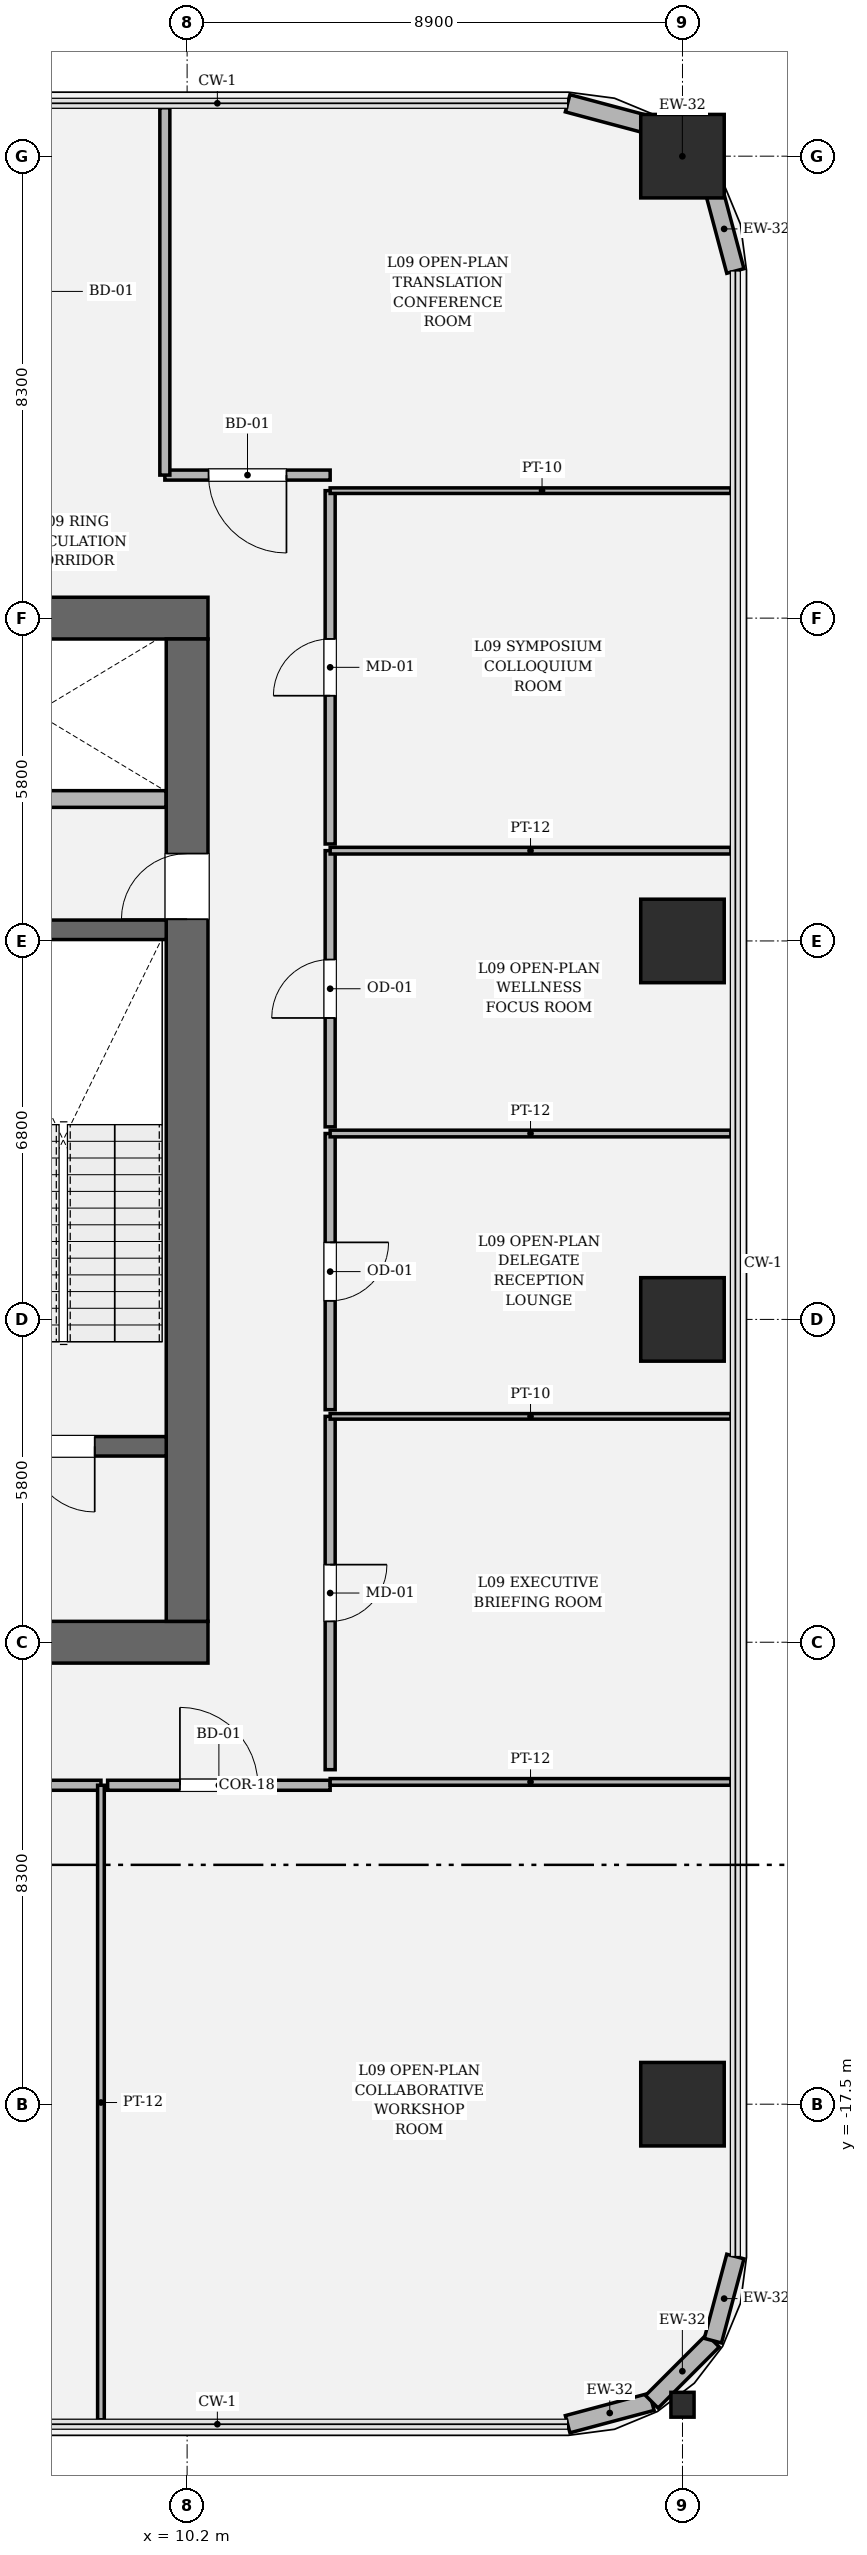
"""IFC4 building model, lengths in metres.
Left out: names, types, materials, properties, quantities, classifications, styles, units other than length and angle.
Written with IfcOpenShell. Run it as: python <this file> out.ifc"""

import sys

from ifc_helpers import new_model, si_unit, direction, frame, frame_2d, origin, origin_2d, place, context, subcontext, project, spatial, rectangle, hollow_rectangle, i_section, extrude, element, fill, save


model = new_model("IFC4")
c1 = context("Model", 3, precision=1e-05, world=origin(), true_north=direction((0.0, 1.0)))
c2 = subcontext(c1, "Body", "Model", "MODEL_VIEW")
j1 = project(units=[si_unit("LENGTHUNIT", "METRE"), si_unit("PLANEANGLEUNIT", "RADIAN")], contexts=[c1])
p1 = place(None, origin())
s1 = spatial("IfcSite", under=j1, at=p1, CompositionType="ELEMENT")
p2 = place(p1, origin())
s2 = spatial("IfcBuilding", under=s1, at=p2, CompositionType="ELEMENT")
p3 = place(p2, frame((0.0, 0.0, 44.4)))
s3 = spatial("IfcBuildingStorey", under=s2, at=p3, CompositionType="ELEMENT", Elevation=44.4)
p4 = place(p3, frame((10.575, -9.2, 0.0), z_axis=(0.0, 0.0, 1.0), x_axis=(-1.0, 0.0, 0.0)))
e1 = element("IfcWall", 1, at=p4, inside=s3, PredefinedType="SHEAR", context=c2, shape_type="SweptSolid", body=[
    extrude(rectangle(XDim=21.15, YDim=0.75, at=frame_2d((10.575, 0.0))), origin(), (0.0, 0.0, 1.0), 4.05),
])
p5 = place(p4, frame((2.85, 0.0, 0.0)))
e2 = element("IfcOpeningElement", 2, at=p5, cuts=e1, PredefinedType="OPENING", context=c2, shape_type="SweptSolid", body=[
    extrude(rectangle(XDim=1.25, YDim=2.25, at=frame_2d((0.625, 1.125))), frame((0.0, 0.385, 0.0), z_axis=(0.0, -1.0, 0.0), x_axis=(1.0, 0.0, 0.0)), (0.0, 0.0, 1.0), 0.77),
])
p6 = place(p4, frame((17.05, 0.0, 0.0)))
e3 = element("IfcOpeningElement", 3, at=p6, cuts=e1, PredefinedType="OPENING", context=c2, shape_type="SweptSolid", body=[
    extrude(rectangle(XDim=1.25, YDim=2.25, at=frame_2d((0.625, 1.125))), frame((0.0, 0.385, 0.0), z_axis=(0.0, -1.0, 0.0), x_axis=(1.0, 0.0, 0.0)), (0.0, 0.0, 1.0), 0.77),
])
p7 = place(p3, frame((-10.575, 9.2, 0.0), z_axis=(0.0, 0.0, 1.0), x_axis=(1.0, 0.0, 0.0)))
e4 = element("IfcWall", 4, at=p7, inside=s3, PredefinedType="SHEAR", context=c2, shape_type="SweptSolid", body=[
    extrude(rectangle(XDim=21.15, YDim=0.75, at=frame_2d((10.575, 0.0))), origin(), (0.0, 0.0, 1.0), 4.05),
])
p8 = place(p3, frame((10.2, 8.825, 0.0), z_axis=(0.0, 0.0, 1.0), x_axis=(0.0, -1.0, 0.0)))
e5 = element("IfcWall", 5, at=p8, inside=s3, PredefinedType="SHEAR", context=c2, shape_type="SweptSolid", body=[
    extrude(rectangle(XDim=17.65, YDim=0.75, at=frame_2d((8.825, 0.0))), origin(), (0.0, 0.0, 1.0), 4.05),
])
p9 = place(p8, frame((3.855, 0.0, 0.0)))
e6 = element("IfcOpeningElement", 6, at=p9, cuts=e5, PredefinedType="OPENING", context=c2, shape_type="SweptSolid", body=[
    extrude(rectangle(XDim=1.18, YDim=2.2, at=frame_2d((0.59, 1.1))), frame((0.0, 0.385, 0.0), z_axis=(0.0, -1.0, 0.0), x_axis=(1.0, 0.0, 0.0)), (0.0, 0.0, 1.0), 0.77),
])
p10 = place(p3, frame((4.65, -5.68, 0.0), z_axis=(0.0, 0.0, 1.0), x_axis=(1.0, 0.0, 0.0)))
e7 = element("IfcWall", 7, at=p10, inside=s3, PredefinedType="SOLIDWALL", context=c2, shape_type="SweptSolid", body=[
    extrude(rectangle(XDim=5.175, YDim=0.35, at=frame_2d((2.587, 0.0))), origin(), (0.0, 0.0, 1.0), 4.05),
])
p11 = place(p10, frame((2.71, 0.0, 0.0)))
e8 = element("IfcOpeningElement", 8, at=p11, cuts=e7, PredefinedType="OPENING", context=c2, shape_type="SweptSolid", body=[
    extrude(rectangle(XDim=1.18, YDim=2.2, at=frame_2d((0.59, 1.1))), frame((0.0, 0.185, 0.0), z_axis=(0.0, -1.0, 0.0), x_axis=(1.0, 0.0, 0.0)), (0.0, 0.0, 1.0), 0.37),
])
p12 = place(p3, frame((4.65, 3.6, 0.0), z_axis=(0.0, 0.0, 1.0), x_axis=(1.0, 0.0, 0.0)))
e9 = element("IfcWall", 9, at=p12, inside=s3, PredefinedType="SOLIDWALL", context=c2, shape_type="SweptSolid", body=[
    extrude(rectangle(XDim=5.175, YDim=0.35, at=frame_2d((2.587, 0.0))), origin(), (0.0, 0.0, 1.0), 4.05),
])
for number, where, z_axis, x_axis in (
    (10, (19.1, -17.5, 0.0), (0.0, 0.0, 1.0), (1.0, 0.0, 0.0)),
    (11, (19.1, -3.4, 0.0), (0.0, 0.0, 1.0), (1.0, 0.0, 0.0)),
    (12, (19.1, 3.4, 0.0), (0.0, 0.0, 1.0), (1.0, 0.0, 0.0)),
    (13, (19.1, 17.5, 0.0), (0.0, 0.0, 1.0), (1.0, 0.0, 0.0)),
):
    element("IfcColumn", number, at=place(p3, frame(where, z_axis=z_axis, x_axis=x_axis)), inside=s3, PredefinedType="COLUMN", context=c2, shape_type="SweptSolid", body=[
        extrude(hollow_rectangle(XDim=1.5, YDim=1.5, WallThickness=0.045, at=origin_2d()), origin(), (0.0, 0.0, 1.0), 4.05),
    ])
p13 = place(p3, frame((19.1, -22.9, 0.0), z_axis=(0.0, 0.0, 1.0), x_axis=(1.0, 0.0, 0.0)))
e14 = element("IfcColumn", 14, at=p13, inside=s3, PredefinedType="COLUMN", context=c2, shape_type="SweptSolid", body=[
    extrude(i_section(OverallWidth=0.416, OverallDepth=0.446, WebThickness=0.039, FlangeThickness=0.062, FilletRadius=0.018, at=origin_2d()), origin(), (0.0, 0.0, 1.0), 4.048),
])
p14 = place(p3, frame((17.037, -23.25, 0.0), z_axis=(0.0, 0.0, 1.0), x_axis=(0.966224582397, 0.257701486942, 0.0)))
e15 = element("IfcWall", 15, at=p14, inside=s3, PredefinedType="SOLIDWALL", context=c2, shape_type="SweptSolid", body=[
    extrude(rectangle(XDim=1.565, YDim=0.32, at=frame_2d((0.783, 0.0))), origin(), (0.0, 0.0, 1.0), 2.524),
])
p15 = place(p3, frame((18.549, -22.847, 0.0), z_axis=(0.0, 0.0, 1.0), x_axis=(0.707028130747, 0.707185422879, 0.0)))
e16 = element("IfcWall", 16, at=p15, inside=s3, PredefinedType="SOLIDWALL", context=c2, shape_type="SweptSolid", body=[
    extrude(rectangle(XDim=1.552, YDim=0.32, at=frame_2d((0.776, 0.0))), origin(), (0.0, 0.0, 1.0), 2.484),
])
for number, where, z_axis, x_axis in (
    (17, (19.646, -21.749, 0.0), (0.0, 0.0, 1.0), (0.258, 0.966, 0.0)),
    (18, (20.05, 15.437, 0.0), (0.0, 0.0, 1.0), (-0.258, 0.966, 0.0)),
):
    element("IfcWall", number, at=place(p3, frame(where, z_axis=z_axis, x_axis=x_axis)), inside=s3, PredefinedType="SOLIDWALL", context=c2, shape_type="SweptSolid", body=[
        extrude(rectangle(XDim=1.565, YDim=0.32, at=frame_2d((0.783, 0.0))), origin(), (0.0, 0.0, 1.0), 3.81),
    ])
p16 = place(p3, frame((19.646, 16.949, 0.0), z_axis=(0.0, 0.0, 1.0), x_axis=(-0.707106781187, 0.707106781187, 0.0)))
e19 = element("IfcWall", 19, at=p16, inside=s3, PredefinedType="SOLIDWALL", context=c2, shape_type="SweptSolid", body=[
    extrude(rectangle(XDim=1.552, YDim=0.32, at=frame_2d((0.776, 0.0))), origin(), (0.0, 0.0, 1.0), 3.104),
])
p17 = place(p3, frame((18.549, 18.047, 0.0), z_axis=(0.0, 0.0, 1.0), x_axis=(-0.966224582397, 0.257701486942, 0.0)))
e20 = element("IfcWall", 20, at=p17, inside=s3, PredefinedType="SOLIDWALL", context=c2, shape_type="SweptSolid", body=[
    extrude(rectangle(XDim=1.565, YDim=0.32, at=frame_2d((0.783, 0.0))), origin(), (0.0, 0.0, 1.0), 3.81),
])
p18 = place(p3, frame((5.06, 5.95, 0.0), z_axis=(0.0, 0.0, 1.0), x_axis=(1.0, 0.0, 0.0)))
e21 = element("IfcWall", 21, at=p18, inside=s3, PredefinedType="SOLIDWALL", context=c2, shape_type="SweptSolid", body=[
    extrude(rectangle(XDim=4.76, YDim=0.3, at=frame_2d((2.38, 0.0))), origin(), (0.0, 0.0, 1.0), 3.81),
])
p19 = place(p3, frame((-7.4, -11.77, 0.0), z_axis=(0.0, 0.0, 1.0), x_axis=(1.0, 0.0, 0.0)))
e22 = element("IfcWall", 22, at=p19, inside=s3, PredefinedType="PARTITIONING", context=c2, shape_type="SweptSolid", body=[
    extrude(rectangle(XDim=16.052, YDim=0.18, at=frame_2d((8.026, 0.0))), origin(), (0.0, 0.0, 1.0), 3.104),
])
p20 = place(p3, frame((8.652, -11.77, 0.0), z_axis=(0.0, 0.0, 1.0), x_axis=(0.0, -1.0, 0.0)))
e23 = element("IfcWall", 23, at=p20, inside=s3, PredefinedType="PARTITIONING", context=c2, shape_type="SweptSolid", body=[
    extrude(rectangle(XDim=11.4, YDim=0.12, at=frame_2d((5.7, 0.0))), origin(), (0.0, 0.0, 1.0), 2.524),
])
p21 = place(p3, frame((8.772, -11.77, 0.0), z_axis=(0.0, 0.0, 1.0), x_axis=(1.0, 0.0, 0.0)))
e24 = element("IfcWall", 24, at=p21, inside=s3, PredefinedType="PARTITIONING", context=c2, shape_type="SweptSolid", body=[
    extrude(rectangle(XDim=3.998, YDim=0.18, at=frame_2d((1.999, 0.0))), origin(), (0.0, 0.0, 1.0), 3.104),
])
p22 = place(p21, frame((1.299, 0.0, 0.0)))
e25 = element("IfcOpeningElement", 25, at=p22, cuts=e24, PredefinedType="OPENING", context=c2, shape_type="SweptSolid", body=[
    extrude(rectangle(XDim=1.4, YDim=2.25, at=frame_2d((0.7, 1.125))), frame((0.0, 0.1, 0.0), z_axis=(0.0, -1.0, 0.0), x_axis=(1.0, 0.0, 0.0)), (0.0, 0.0, 1.0), 0.2),
])
p23 = place(p3, frame((12.77, -11.71, 0.0), z_axis=(0.0, 0.0, 1.0), x_axis=(1.0, 0.0, 0.0)))
e26 = element("IfcWall", 26, at=p23, inside=s3, PredefinedType="PARTITIONING", context=c2, shape_type="SweptSolid", body=[
    extrude(rectangle(XDim=7.2, YDim=0.12, at=frame_2d((3.6, 0.0))), origin(), (0.0, 0.0, 1.0), 3.104),
])
p24 = place(p3, frame((12.77, -11.49, 0.0), z_axis=(0.0, 0.0, 1.0), x_axis=(0.0, 1.0, 0.0)))
e27 = element("IfcWall", 27, at=p24, inside=s3, PredefinedType="PARTITIONING", context=c2, shape_type="SweptSolid", body=[
    extrude(rectangle(XDim=6.348, YDim=0.18, at=frame_2d((3.174, 0.0))), origin(), (0.0, 0.0, 1.0), 3.104),
])
p25 = place(p24, frame((2.664, 0.0, 0.0)))
e28 = element("IfcOpeningElement", 28, at=p25, cuts=e27, PredefinedType="OPENING", context=c2, shape_type="SweptSolid", body=[
    extrude(rectangle(XDim=1.02, YDim=2.2, at=frame_2d((0.51, 1.1))), frame((0.0, 0.1, 0.0), z_axis=(0.0, -1.0, 0.0), x_axis=(1.0, 0.0, 0.0)), (0.0, 0.0, 1.0), 0.2),
])
p26 = place(p3, frame((12.77, -5.142, 0.0), z_axis=(0.0, 0.0, 1.0), x_axis=(1.0, 0.0, 0.0)))
e29 = element("IfcWall", 29, at=p26, inside=s3, PredefinedType="PARTITIONING", context=c2, shape_type="SweptSolid", body=[
    extrude(rectangle(XDim=7.2, YDim=0.1, at=frame_2d((3.6, 0.0))), origin(), (0.0, 0.0, 1.0), 3.104),
])
p27 = place(p3, frame((12.77, -5.022, 0.0), z_axis=(0.0, 0.0, 1.0), x_axis=(0.0, 1.0, 0.0)))
e30 = element("IfcWall", 30, at=p27, inside=s3, PredefinedType="PARTITIONING", context=c2, shape_type="SweptSolid", body=[
    extrude(rectangle(XDim=4.962, YDim=0.18, at=frame_2d((2.481, 0.0))), origin(), (0.0, 0.0, 1.0), 3.104),
])
p28 = place(p27, frame((1.956, 0.0, 0.0)))
e31 = element("IfcOpeningElement", 31, at=p28, cuts=e30, PredefinedType="OPENING", context=c2, shape_type="SweptSolid", body=[
    extrude(rectangle(XDim=1.05, YDim=2.2, at=frame_2d((0.525, 1.1))), frame((0.0, 0.1, 0.0), z_axis=(0.0, -1.0, 0.0), x_axis=(1.0, 0.0, 0.0)), (0.0, 0.0, 1.0), 0.2),
])
p29 = place(p3, frame((12.77, -0.06, 0.0), z_axis=(0.0, 0.0, 1.0), x_axis=(1.0, 0.0, 0.0)))
e32 = element("IfcWall", 32, at=p29, inside=s3, PredefinedType="PARTITIONING", context=c2, shape_type="SweptSolid", body=[
    extrude(rectangle(XDim=7.2, YDim=0.12, at=frame_2d((3.6, 0.0))), origin(), (0.0, 0.0, 1.0), 3.104),
])
p30 = place(p3, frame((12.77, 0.06, 0.0), z_axis=(0.0, 0.0, 1.0), x_axis=(0.0, 1.0, 0.0)))
e33 = element("IfcWall", 33, at=p30, inside=s3, PredefinedType="PARTITIONING", context=c2, shape_type="SweptSolid", body=[
    extrude(rectangle(XDim=4.962, YDim=0.18, at=frame_2d((2.481, 0.0))), origin(), (0.0, 0.0, 1.0), 3.104),
])
p31 = place(p30, frame((1.956, 0.0, 0.0)))
e34 = element("IfcOpeningElement", 34, at=p31, cuts=e33, PredefinedType="OPENING", context=c2, shape_type="SweptSolid", body=[
    extrude(rectangle(XDim=1.05, YDim=2.2, at=frame_2d((0.525, 1.1))), frame((0.0, 0.1, 0.0), z_axis=(0.0, -1.0, 0.0), x_axis=(1.0, 0.0, 0.0)), (0.0, 0.0, 1.0), 0.2),
])
p32 = place(p3, frame((12.77, 5.022, 0.0), z_axis=(0.0, 0.0, 1.0), x_axis=(1.0, 0.0, 0.0)))
e35 = element("IfcWall", 35, at=p32, inside=s3, PredefinedType="PARTITIONING", context=c2, shape_type="SweptSolid", body=[
    extrude(rectangle(XDim=7.2, YDim=0.12, at=frame_2d((3.6, 0.0))), origin(), (0.0, 0.0, 1.0), 3.104),
])
p33 = place(p3, frame((12.77, 5.142, 0.0), z_axis=(0.0, 0.0, 1.0), x_axis=(0.0, 1.0, 0.0)))
e36 = element("IfcWall", 36, at=p33, inside=s3, PredefinedType="PARTITIONING", context=c2, shape_type="SweptSolid", body=[
    extrude(rectangle(XDim=6.348, YDim=0.18, at=frame_2d((3.174, 0.0))), origin(), (0.0, 0.0, 1.0), 3.104),
])
p34 = place(p33, frame((2.664, 0.0, 0.0)))
e37 = element("IfcOpeningElement", 37, at=p34, cuts=e36, PredefinedType="OPENING", context=c2, shape_type="SweptSolid", body=[
    extrude(rectangle(XDim=1.02, YDim=2.2, at=frame_2d((0.51, 1.1))), frame((0.0, 0.1, 0.0), z_axis=(0.0, -1.0, 0.0), x_axis=(1.0, 0.0, 0.0)), (0.0, 0.0, 1.0), 0.2),
])
p35 = place(p3, frame((12.77, 11.49, 0.0), z_axis=(0.0, 0.0, 1.0), x_axis=(1.0, 0.0, 0.0)))
e38 = element("IfcWall", 38, at=p35, inside=s3, PredefinedType="PARTITIONING", context=c2, shape_type="SweptSolid", body=[
    extrude(rectangle(XDim=7.2, YDim=0.1, at=frame_2d((3.6, 0.0))), origin(), (0.0, 0.0, 1.0), 3.104),
])
p36 = place(p3, frame((12.77, 11.77, 0.0), z_axis=(0.0, 0.0, 1.0), x_axis=(-1.0, 0.0, 0.0)))
e39 = element("IfcWall", 39, at=p36, inside=s3, PredefinedType="PARTITIONING", context=c2, shape_type="SweptSolid", body=[
    extrude(rectangle(XDim=2.97, YDim=0.18, at=frame_2d((1.485, 0.0))), origin(), (0.0, 0.0, 1.0), 3.104),
])
p37 = place(p36, frame((0.785, 0.0, 0.0)))
e40 = element("IfcOpeningElement", 40, at=p37, cuts=e39, PredefinedType="OPENING", context=c2, shape_type="SweptSolid", body=[
    extrude(rectangle(XDim=1.4, YDim=2.25, at=frame_2d((0.7, 1.125))), frame((0.0, 0.1, 0.0), z_axis=(0.0, -1.0, 0.0), x_axis=(1.0, 0.0, 0.0)), (0.0, 0.0, 1.0), 0.2),
])
p38 = place(p3, frame((9.8, 11.77, 0.0), z_axis=(0.0, 0.0, 1.0), x_axis=(0.0, 1.0, 0.0)))
e41 = element("IfcWall", 41, at=p38, inside=s3, PredefinedType="PARTITIONING", context=c2, shape_type="SweptSolid", body=[
    extrude(rectangle(XDim=6.6, YDim=0.18, at=frame_2d((3.3, 0.0))), origin(), (0.0, 0.0, 1.0), 3.104),
])
p39 = place(p11, origin())
e42 = element("IfcDoor", 42, at=p39, inside=s3, OperationType="SINGLE_SWING_RIGHT", PredefinedType="DOOR", context=c2, shape_type="SweptSolid", body=[
    extrude(rectangle(XDim=1.18, YDim=2.2, at=frame_2d((0.59, 1.1))), frame((0.0, 0.025, 0.0), z_axis=(0.0, -1.0, 0.0), x_axis=(1.0, 0.0, 0.0)), (0.0, 0.0, 1.0), 0.05),
])
fill(e8, e42)
p40 = place(p9, origin())
e43 = element("IfcDoor", 43, at=p40, inside=s3, OperationType="SINGLE_SWING_RIGHT", PredefinedType="DOOR", context=c2, shape_type="SweptSolid", body=[
    extrude(rectangle(XDim=1.18, YDim=2.2, at=frame_2d((0.59, 1.1))), frame((0.0, 0.025, 0.0), z_axis=(0.0, -1.0, 0.0), x_axis=(1.0, 0.0, 0.0)), (0.0, 0.0, 1.0), 0.05),
])
fill(e6, e43)
p41 = place(p22, origin())
e44 = element("IfcDoor", 44, at=p41, inside=s3, OperationType="SINGLE_SWING_LEFT", PredefinedType="DOOR", context=c2, shape_type="SweptSolid", body=[
    extrude(rectangle(XDim=1.4, YDim=2.25, at=frame_2d((0.7, 1.125))), frame((0.0, 0.025, 0.0), z_axis=(0.0, -1.0, 0.0), x_axis=(1.0, 0.0, 0.0)), (0.0, 0.0, 1.0), 0.05),
])
fill(e25, e44)
p42 = place(p25, origin())
e45 = element("IfcDoor", 45, at=p42, inside=s3, OperationType="SINGLE_SWING_RIGHT", PredefinedType="DOOR", context=c2, shape_type="SweptSolid", body=[
    extrude(rectangle(XDim=1.02, YDim=2.2, at=frame_2d((0.51, 1.1))), frame((0.0, 0.025, 0.0), z_axis=(0.0, -1.0, 0.0), x_axis=(1.0, 0.0, 0.0)), (0.0, 0.0, 1.0), 0.05),
])
fill(e28, e45)
p43 = place(p28, origin())
e46 = element("IfcDoor", 46, at=p43, inside=s3, OperationType="SINGLE_SWING_RIGHT", PredefinedType="DOOR", context=c2, shape_type="SweptSolid", body=[
    extrude(rectangle(XDim=1.05, YDim=2.2, at=frame_2d((0.525, 1.1))), frame((0.0, 0.025, 0.0), z_axis=(0.0, -1.0, 0.0), x_axis=(1.0, 0.0, 0.0)), (0.0, 0.0, 1.0), 0.05),
])
fill(e31, e46)
p44 = place(p31, origin())
e47 = element("IfcDoor", 47, at=p44, inside=s3, OperationType="SINGLE_SWING_LEFT", PredefinedType="DOOR", context=c2, shape_type="SweptSolid", body=[
    extrude(rectangle(XDim=1.05, YDim=2.2, at=frame_2d((0.525, 1.1))), frame((0.0, 0.025, 0.0), z_axis=(0.0, -1.0, 0.0), x_axis=(1.0, 0.0, 0.0)), (0.0, 0.0, 1.0), 0.05),
])
fill(e34, e47)
p45 = place(p34, origin())
e48 = element("IfcDoor", 48, at=p45, inside=s3, OperationType="SINGLE_SWING_LEFT", PredefinedType="DOOR", context=c2, shape_type="SweptSolid", body=[
    extrude(rectangle(XDim=1.02, YDim=2.2, at=frame_2d((0.51, 1.1))), frame((0.0, 0.025, 0.0), z_axis=(0.0, -1.0, 0.0), x_axis=(1.0, 0.0, 0.0)), (0.0, 0.0, 1.0), 0.05),
])
fill(e37, e48)
p46 = place(p37, origin())
e49 = element("IfcDoor", 49, at=p46, inside=s3, OperationType="SINGLE_SWING_LEFT", PredefinedType="DOOR", context=c2, shape_type="SweptSolid", body=[
    extrude(rectangle(XDim=1.4, YDim=2.25, at=frame_2d((0.7, 1.125))), frame((0.0, 0.025, 0.0), z_axis=(0.0, -1.0, 0.0), x_axis=(1.0, 0.0, 0.0)), (0.0, 0.0, 1.0), 0.05),
])
fill(e40, e49)
save(model, sys.argv[1])
